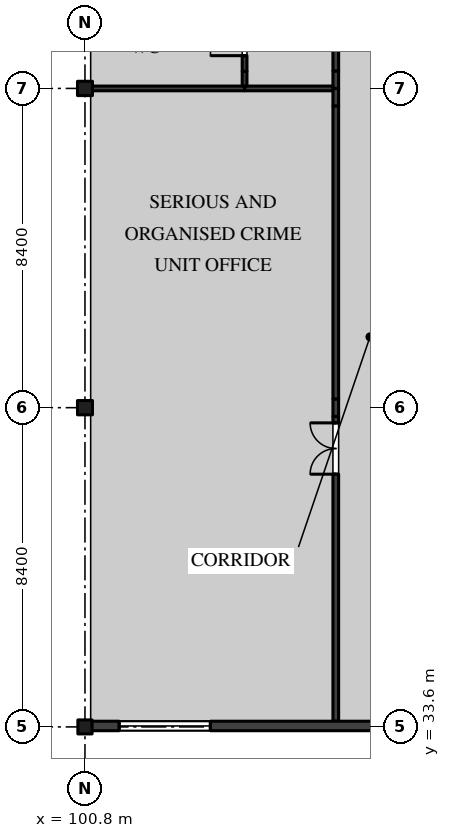
"""IFC4 building model, lengths in metres.
Left out: names, types, materials, properties, quantities, classifications, styles, units other than length and angle.
Written with IfcOpenShell. Run it as: python <this file> out.ifc"""

import sys

from ifc_helpers import new_model, si_unit, direction, frame, frame_2d, origin, origin_2d, place, context, subcontext, project, spatial, rectangle, i_section, extrude, element, fill, save


model = new_model("IFC4")
c1 = context("Model", 3, precision=1e-05, world=origin(), true_north=direction((0.0, 1.0)))
c2 = subcontext(c1, "Body", "Model", "MODEL_VIEW")
j1 = project(units=[si_unit("LENGTHUNIT", "METRE"), si_unit("PLANEANGLEUNIT", "RADIAN")], contexts=[c1])
p1 = place(None, origin())
s1 = spatial("IfcSite", under=j1, at=p1, CompositionType="ELEMENT")
p2 = place(p1, origin())
s2 = spatial("IfcBuilding", under=s1, at=p2, CompositionType="ELEMENT")
p3 = place(p2, frame((0.0, 0.0, 18.9)))
s3 = spatial("IfcBuildingStorey", under=s2, at=p3, CompositionType="ELEMENT", Elevation=18.9)
p4 = place(p3, frame((100.8, 33.6, 0.0), z_axis=(0.0, 0.0, 1.0), x_axis=(1.0, 0.0, 0.0)))
e1 = element("IfcColumn", 1, at=p4, inside=s3, PredefinedType="COLUMN", context=c2, shape_type="SweptSolid", body=[
    extrude(i_section(OverallWidth=0.373, OverallDepth=0.368, WebThickness=0.015, FlangeThickness=0.024, FilletRadius=0.015, at=origin_2d()), origin(), (0.0, 0.0, 1.0), 4.37),
])
for number, where, z_axis, x_axis in (
    (2, (100.8, 42.0, 0.0), (0.0, 0.0, 1.0), (1.0, 0.0, 0.0)),
    (3, (100.8, 50.4, 0.0), (0.0, 0.0, 1.0), (1.0, 0.0, 0.0)),
):
    element("IfcColumn", number, at=place(p3, frame(where, z_axis=z_axis, x_axis=x_axis)), inside=s3, PredefinedType="COLUMN", context=c2, shape_type="SweptSolid", body=[
        extrude(i_section(OverallWidth=0.394, OverallDepth=0.376, WebThickness=0.017, FlangeThickness=0.028, FilletRadius=0.015, at=origin_2d()), origin(), (0.0, 0.0, 1.0), 4.37),
    ])
p5 = place(p3, frame((107.4, 33.75, 0.0), z_axis=(0.0, 0.0, 1.0), x_axis=(0.0, 1.0, 0.0)))
e4 = element("IfcWall", 4, at=p5, inside=s3, PredefinedType="PARTITIONING", context=c2, shape_type="SweptSolid", body=[
    extrude(rectangle(XDim=8.02, YDim=0.15, at=frame_2d((4.01, 0.0))), origin(), (0.0, 0.0, 1.0), 4.37),
])
p6 = place(p5, frame((6.5, 0.0, 0.0)))
e5 = element("IfcOpeningElement", 5, at=p6, cuts=e4, PredefinedType="OPENING", context=c2, shape_type="SweptSolid", body=[
    extrude(rectangle(XDim=1.35, YDim=2.1, at=frame_2d((0.675, 1.05))), frame((0.0, 0.085, 0.0), z_axis=(0.0, -1.0, 0.0), x_axis=(1.0, 0.0, 0.0)), (0.0, 0.0, 1.0), 0.17),
])
p7 = place(p3, frame((107.4, 41.77, 0.0), z_axis=(0.0, 0.0, 1.0), x_axis=(0.0, 1.0, 0.0)))
e6 = element("IfcWall", 6, at=p7, inside=s3, PredefinedType="PARTITIONING", context=c2, shape_type="SweptSolid", body=[
    extrude(rectangle(XDim=0.46, YDim=0.15, at=frame_2d((0.23, 0.0))), origin(), (0.0, 0.0, 1.0), 3.746),
])
p8 = place(p3, frame((107.4, 42.23, 0.0), z_axis=(0.0, 0.0, 1.0), x_axis=(0.0, 1.0, 0.0)))
e7 = element("IfcWall", 7, at=p8, inside=s3, PredefinedType="PARTITIONING", context=c2, shape_type="SweptSolid", body=[
    extrude(rectangle(XDim=7.71, YDim=0.15, at=frame_2d((3.855, 0.0))), origin(), (0.0, 0.0, 1.0), 4.37),
])
p9 = place(p3, frame((107.4, 49.94, 0.0), z_axis=(0.0, 0.0, 1.0), x_axis=(0.0, 1.0, 0.0)))
e8 = element("IfcWall", 8, at=p9, inside=s3, PredefinedType="PARTITIONING", context=c2, shape_type="SweptSolid", body=[
    extrude(rectangle(XDim=0.46, YDim=0.15, at=frame_2d((0.23, 0.0))), origin(), (0.0, 0.0, 1.0), 3.746),
])
p10 = place(p3, frame((107.4, 50.4, 0.0), z_axis=(0.0, 0.0, 1.0), x_axis=(0.0, 1.0, 0.0)))
e9 = element("IfcWall", 9, at=p10, inside=s3, PredefinedType="PARTITIONING", context=c2, shape_type="SweptSolid", body=[
    extrude(rectangle(XDim=0.46, YDim=0.15, at=frame_2d((0.23, 0.0))), origin(), (0.0, 0.0, 1.0), 3.746),
])
p11 = place(p3, frame((107.4, 50.86, 0.0), z_axis=(0.0, 0.0, 1.0), x_axis=(0.0, 1.0, 0.0)))
e10 = element("IfcWall", 10, at=p11, inside=s3, PredefinedType="PARTITIONING", context=c2, shape_type="SweptSolid", body=[
    extrude(rectangle(XDim=7.48, YDim=0.15, at=frame_2d((3.74, 0.0))), origin(), (0.0, 0.0, 1.0), 4.37),
])
p12 = place(p11, frame((2.09, 0.0, 0.0)))
e11 = element("IfcOpeningElement", 11, at=p12, cuts=e10, PredefinedType="OPENING", context=c2, shape_type="SweptSolid", body=[
    extrude(rectangle(XDim=0.9, YDim=2.1, at=frame_2d((0.45, 1.05))), frame((0.0, 0.085, 0.0), z_axis=(0.0, -1.0, 0.0), x_axis=(1.0, 0.0, 0.0)), (0.0, 0.0, 1.0), 0.17),
])
p13 = place(p3, frame((105.0, 50.4, 0.0), z_axis=(0.0, 0.0, 1.0), x_axis=(1.0, 0.0, 0.0)))
e12 = element("IfcWall", 12, at=p13, inside=s3, PredefinedType="PARTITIONING", context=c2, shape_type="SweptSolid", body=[
    extrude(rectangle(XDim=2.325, YDim=0.125, at=frame_2d((1.163, 0.0))), origin(), (0.0, 0.0, 1.0), 3.746),
])
p14 = place(p3, frame((100.997, 50.4, 0.0), z_axis=(0.0, 0.0, 1.0), x_axis=(1.0, 0.0, 0.0)))
e13 = element("IfcWall", 13, at=p14, inside=s3, PredefinedType="PARTITIONING", context=c2, shape_type="SweptSolid", body=[
    extrude(rectangle(XDim=4.003, YDim=0.125, at=frame_2d((2.001, 0.0))), origin(), (0.0, 0.0, 1.0), 3.746),
])
p15 = place(p3, frame((105.0, 50.462, 0.0), z_axis=(0.0, 0.0, 1.0), x_axis=(0.0, 1.0, 0.0)))
e14 = element("IfcWall", 14, at=p15, inside=s3, PredefinedType="PARTITIONING", context=c2, shape_type="SweptSolid", body=[
    extrude(rectangle(XDim=0.385, YDim=0.125, at=frame_2d((0.192, 0.0))), origin(), (0.0, 0.0, 1.0), 3.746),
])
p16 = place(p3, frame((105.0, 50.847, 0.0), z_axis=(0.0, 0.0, 1.0), x_axis=(0.0, 1.0, 0.0)))
e15 = element("IfcWall", 15, at=p16, inside=s3, PredefinedType="PARTITIONING", context=c2, shape_type="SweptSolid", body=[
    extrude(rectangle(XDim=2.553, YDim=0.125, at=frame_2d((1.276, 0.0))), origin(), (0.0, 0.0, 1.0), 4.37),
])
p17 = place(p16, frame((0.415, 0.0, 0.0)))
e16 = element("IfcOpeningElement", 16, at=p17, cuts=e15, PredefinedType="OPENING", context=c2, shape_type="SweptSolid", body=[
    extrude(rectangle(XDim=0.9, YDim=2.1, at=frame_2d((0.45, 1.05))), frame((0.0, 0.073, 0.0), z_axis=(0.0, -1.0, 0.0), x_axis=(1.0, 0.0, 0.0)), (0.0, 0.0, 1.0), 0.145),
])
p18 = place(p3, frame((100.803, 33.625, 0.0), z_axis=(0.0, 0.0, 1.0), x_axis=(1.0, 0.0, 0.0)))
e17 = element("IfcWall", 17, at=p18, inside=s3, PredefinedType="SOLIDWALL", context=c2, shape_type="SweptSolid", body=[
    extrude(rectangle(XDim=8.197, YDim=0.25, at=frame_2d((4.099, 0.0))), origin(), (0.0, 0.0, 1.0), 3.746),
])
p19 = place(p18, frame((0.897, 0.0, 0.9)))
e18 = element("IfcOpeningElement", 18, at=p19, cuts=e17, PredefinedType="OPENING", context=c2, shape_type="SweptSolid", body=[
    extrude(rectangle(XDim=2.4, YDim=2.1, at=frame_2d((1.2, 1.05))), frame((0.0, 0.135, 0.0), z_axis=(0.0, -1.0, 0.0), x_axis=(1.0, 0.0, 0.0)), (0.0, 0.0, 1.0), 0.27),
])
p20 = place(p6, origin())
e19 = element("IfcDoor", 19, at=p20, inside=s3, OperationType="DOUBLE_DOOR_SINGLE_SWING", PredefinedType="DOOR", context=c2, shape_type="SweptSolid", body=[
    extrude(rectangle(XDim=1.35, YDim=2.1, at=frame_2d((0.675, 1.05))), frame((0.0, 0.025, 0.0), z_axis=(0.0, -1.0, 0.0), x_axis=(1.0, 0.0, 0.0)), (0.0, 0.0, 1.0), 0.05),
])
fill(e5, e19)
p21 = place(p17, origin())
e20 = element("IfcDoor", 20, at=p21, inside=s3, OperationType="SINGLE_SWING_RIGHT", PredefinedType="DOOR", context=c2, shape_type="SweptSolid", body=[
    extrude(rectangle(XDim=0.9, YDim=2.1, at=frame_2d((0.45, 1.05))), frame((0.0, 0.02, 0.0), z_axis=(0.0, -1.0, 0.0), x_axis=(1.0, 0.0, 0.0)), (0.0, 0.0, 1.0), 0.04),
])
fill(e16, e20)
p22 = place(p19, origin())
e21 = element("IfcWindow", 21, at=p22, inside=s3, PartitioningType="SINGLE_PANEL", PredefinedType="WINDOW", context=c2, shape_type="SweptSolid", body=[
    extrude(rectangle(XDim=2.4, YDim=2.1, at=frame_2d((1.2, 1.05))), frame((0.0, 0.04, 0.0), z_axis=(0.0, -1.0, 0.0), x_axis=(1.0, 0.0, 0.0)), (0.0, 0.0, 1.0), 0.08),
])
fill(e18, e21)
save(model, sys.argv[1])
